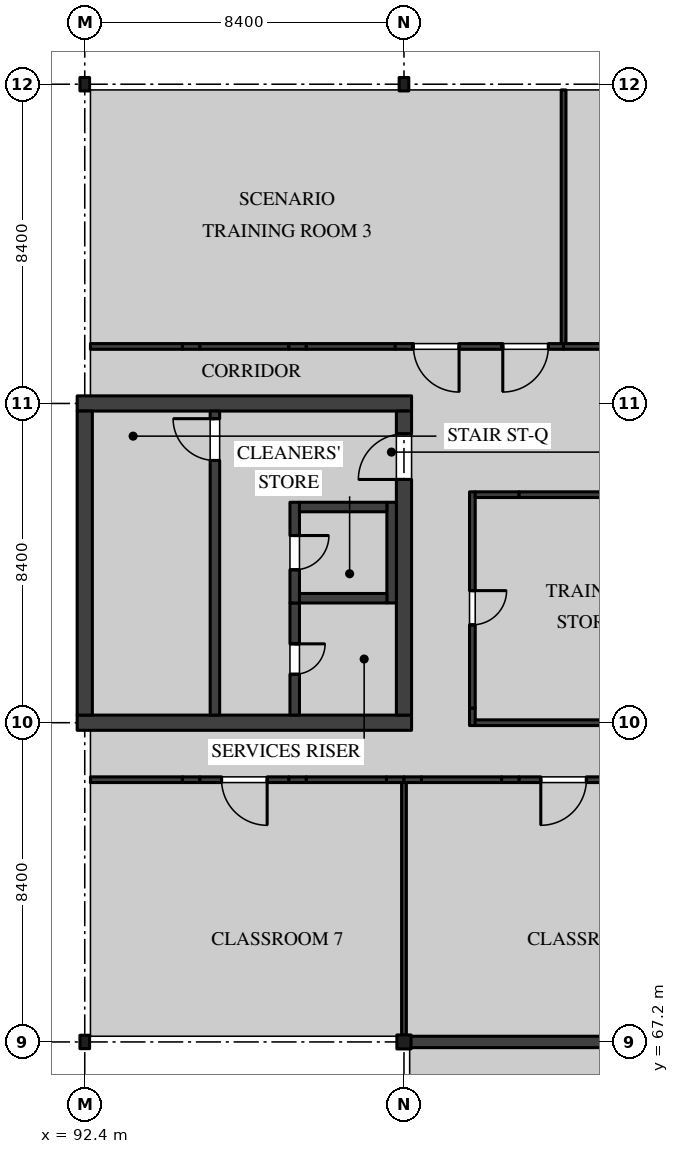
"""IFC4 building model, lengths in metres.
Left out: names, types, materials, properties, quantities, classifications, styles, units other than length and angle.
Written with IfcOpenShell. Run it as: python <this file> out.ifc"""

import sys

from ifc_helpers import new_model, si_unit, direction, frame, frame_2d, origin, origin_2d, place, context, subcontext, project, spatial, rectangle, i_section, extrude, element, fill, save


model = new_model("IFC4")
c1 = context("Model", 3, precision=1e-05, world=origin(), true_north=direction((0.0, 1.0)))
c2 = subcontext(c1, "Body", "Model", "MODEL_VIEW")
j1 = project(units=[si_unit("LENGTHUNIT", "METRE"), si_unit("PLANEANGLEUNIT", "RADIAN")], contexts=[c1])
p1 = place(None, origin())
s1 = spatial("IfcSite", under=j1, at=p1, CompositionType="ELEMENT")
p2 = place(p1, origin())
s2 = spatial("IfcBuilding", under=s1, at=p2, CompositionType="ELEMENT")
p3 = place(p2, frame((0.0, 0.0, 18.9)))
s3 = spatial("IfcBuildingStorey", under=s2, at=p3, CompositionType="ELEMENT", Elevation=18.9)
for number, where, z_axis, x_axis in (
    (1, (92.4, 67.2, 0.0), (0.0, 0.0, 1.0), (1.0, 0.0, 0.0)),
    (2, (92.4, 92.4, 0.0), (0.0, 0.0, 1.0), (1.0, 0.0, 0.0)),
):
    element("IfcColumn", number, at=place(p3, frame(where, z_axis=z_axis, x_axis=x_axis)), inside=s3, PredefinedType="COLUMN", context=c2, shape_type="SweptSolid", body=[
        extrude(i_section(OverallWidth=0.254, OverallDepth=0.353, WebThickness=0.01, FlangeThickness=0.016, FilletRadius=0.015, at=origin_2d()), origin(), (0.0, 0.0, 1.0), 4.37),
    ])
p4 = place(p3, frame((100.8, 67.2, 0.0), z_axis=(0.0, 0.0, 1.0), x_axis=(1.0, 0.0, 0.0)))
e3 = element("IfcColumn", 3, at=p4, inside=s3, PredefinedType="COLUMN", context=c2, shape_type="SweptSolid", body=[
    extrude(i_section(OverallWidth=0.373, OverallDepth=0.368, WebThickness=0.015, FlangeThickness=0.024, FilletRadius=0.015, at=origin_2d()), origin(), (0.0, 0.0, 1.0), 4.37),
])
p5 = place(p3, frame((100.8, 92.4, 0.0), z_axis=(0.0, 0.0, 1.0), x_axis=(1.0, 0.0, 0.0)))
e4 = element("IfcColumn", 4, at=p5, inside=s3, PredefinedType="COLUMN", context=c2, shape_type="SweptSolid", body=[
    extrude(i_section(OverallWidth=0.254, OverallDepth=0.353, WebThickness=0.01, FlangeThickness=0.016, FilletRadius=0.015, at=origin_2d()), origin(), (0.0, 0.0, 1.0), 4.37),
])
for number, where, z_axis, x_axis in (
    (5, (92.2, 75.6, 0.0), (0.0, 0.0, 1.0), (1.0, 0.0, 0.0)),
    (6, (92.2, 84.0, 0.0), (0.0, 0.0, 1.0), (1.0, 0.0, 0.0)),
):
    element("IfcWall", number, at=place(p3, frame(where, z_axis=z_axis, x_axis=x_axis)), inside=s3, PredefinedType="SHEAR", context=c2, shape_type="SweptSolid", body=[
        extrude(rectangle(XDim=8.8, YDim=0.4, at=frame_2d((4.4, 0.0))), origin(), (0.0, 0.0, 1.0), 4.37),
    ])
p6 = place(p3, frame((92.4, 75.8, 0.0), z_axis=(0.0, 0.0, 1.0), x_axis=(0.0, 1.0, 0.0)))
e7 = element("IfcWall", 7, at=p6, inside=s3, PredefinedType="SHEAR", context=c2, shape_type="SweptSolid", body=[
    extrude(rectangle(XDim=8.0, YDim=0.4, at=frame_2d((4.0, 0.0))), origin(), (0.0, 0.0, 1.0), 4.37),
])
p7 = place(p3, frame((100.8, 75.8, 0.0), z_axis=(0.0, 0.0, 1.0), x_axis=(0.0, 1.0, 0.0)))
e8 = element("IfcWall", 8, at=p7, inside=s3, PredefinedType="SHEAR", context=c2, shape_type="SweptSolid", body=[
    extrude(rectangle(XDim=8.0, YDim=0.4, at=frame_2d((4.0, 0.0))), origin(), (0.0, 0.0, 1.0), 4.37),
])
p8 = place(p7, frame((6.2, 0.0, 0.0)))
e9 = element("IfcOpeningElement", 9, at=p8, cuts=e8, PredefinedType="OPENING", context=c2, shape_type="SweptSolid", body=[
    extrude(rectangle(XDim=1.2, YDim=2.1, at=frame_2d((0.6, 1.05))), frame((0.0, 0.21, 0.0), z_axis=(0.0, -1.0, 0.0), x_axis=(1.0, 0.0, 0.0)), (0.0, 0.0, 1.0), 0.42),
])
p9 = place(p3, frame((95.825, 83.8, 0.0), z_axis=(0.0, 0.0, 1.0), x_axis=(0.0, -1.0, 0.0)))
e10 = element("IfcWall", 10, at=p9, inside=s3, PredefinedType="SOLIDWALL", context=c2, shape_type="SweptSolid", body=[
    extrude(rectangle(XDim=8.0, YDim=0.25, at=frame_2d((4.0, 0.0))), origin(), (0.0, 0.0, 1.0), 4.37),
])
p10 = place(p9, frame((0.2, 0.0, 0.0)))
e11 = element("IfcOpeningElement", 11, at=p10, cuts=e10, PredefinedType="OPENING", context=c2, shape_type="SweptSolid", body=[
    extrude(rectangle(XDim=1.1, YDim=2.1, at=frame_2d((0.55, 1.05))), frame((0.0, 0.135, 0.0), z_axis=(0.0, -1.0, 0.0), x_axis=(1.0, 0.0, 0.0)), (0.0, 0.0, 1.0), 0.27),
])
p11 = place(p3, frame((97.925, 78.75, 0.0), z_axis=(0.0, 0.0, 1.0), x_axis=(0.0, -1.0, 0.0)))
e12 = element("IfcWall", 12, at=p11, inside=s3, PredefinedType="SOLIDWALL", context=c2, shape_type="SweptSolid", body=[
    extrude(rectangle(XDim=2.95, YDim=0.25, at=frame_2d((1.475, 0.0))), origin(), (0.0, 0.0, 1.0), 4.37),
])
p12 = place(p11, frame((1.075, 0.0, 0.0)))
e13 = element("IfcOpeningElement", 13, at=p12, cuts=e12, PredefinedType="OPENING", context=c2, shape_type="SweptSolid", body=[
    extrude(rectangle(XDim=0.8, YDim=2.1, at=frame_2d((0.4, 1.05))), frame((0.0, 0.135, 0.0), z_axis=(0.0, -1.0, 0.0), x_axis=(1.0, 0.0, 0.0)), (0.0, 0.0, 1.0), 0.27),
])
p13 = place(p3, frame((97.925, 81.4, 0.0), z_axis=(0.0, 0.0, 1.0), x_axis=(0.0, -1.0, 0.0)))
e14 = element("IfcWall", 14, at=p13, inside=s3, PredefinedType="SOLIDWALL", context=c2, shape_type="SweptSolid", body=[
    extrude(rectangle(XDim=2.65, YDim=0.25, at=frame_2d((1.325, 0.0))), origin(), (0.0, 0.0, 1.0), 4.37),
])
p14 = place(p13, frame((0.875, 0.0, 0.0)))
e15 = element("IfcOpeningElement", 15, at=p14, cuts=e14, PredefinedType="OPENING", context=c2, shape_type="SweptSolid", body=[
    extrude(rectangle(XDim=0.9, YDim=2.1, at=frame_2d((0.45, 1.05))), frame((0.0, 0.135, 0.0), z_axis=(0.0, -1.0, 0.0), x_axis=(1.0, 0.0, 0.0)), (0.0, 0.0, 1.0), 0.27),
])
p15 = place(p3, frame((100.475, 81.4, 0.0), z_axis=(0.0, 0.0, 1.0), x_axis=(0.0, -1.0, 0.0)))
e16 = element("IfcWall", 16, at=p15, inside=s3, PredefinedType="SOLIDWALL", context=c2, shape_type="SweptSolid", body=[
    extrude(rectangle(XDim=2.65, YDim=0.25, at=frame_2d((1.325, 0.0))), origin(), (0.0, 0.0, 1.0), 4.37),
])
for number, where, z_axis, x_axis in (
    (17, (98.05, 81.275, 0.0), (0.0, 0.0, 1.0), (1.0, 0.0, 0.0)),
    (18, (98.05, 78.875, 0.0), (0.0, 0.0, 1.0), (1.0, 0.0, 0.0)),
):
    element("IfcWall", number, at=place(p3, frame(where, z_axis=z_axis, x_axis=x_axis)), inside=s3, PredefinedType="SOLIDWALL", context=c2, shape_type="SweptSolid", body=[
        extrude(rectangle(XDim=2.3, YDim=0.25, at=frame_2d((1.15, 0.0))), origin(), (0.0, 0.0, 1.0), 4.37),
    ])
p16 = place(p3, frame((102.6, 75.525, 0.0), z_axis=(0.0, 0.0, 1.0), x_axis=(0.0, 1.0, 0.0)))
e19 = element("IfcWall", 19, at=p16, inside=s3, PredefinedType="PARTITIONING", context=c2, shape_type="SweptSolid", body=[
    extrude(rectangle(XDim=0.46, YDim=0.15, at=frame_2d((0.23, 0.0))), origin(), (0.0, 0.0, 1.0), 3.819),
])
p17 = place(p3, frame((102.6, 75.985, 0.0), z_axis=(0.0, 0.0, 1.0), x_axis=(0.0, 1.0, 0.0)))
e20 = element("IfcWall", 20, at=p17, inside=s3, PredefinedType="PARTITIONING", context=c2, shape_type="SweptSolid", body=[
    extrude(rectangle(XDim=5.69, YDim=0.15, at=frame_2d((2.845, 0.0))), origin(), (0.0, 0.0, 1.0), 4.37),
])
p18 = place(p17, frame((2.19, 0.0, 0.0)))
e21 = element("IfcOpeningElement", 21, at=p18, cuts=e20, PredefinedType="OPENING", context=c2, shape_type="SweptSolid", body=[
    extrude(rectangle(XDim=0.9, YDim=2.1, at=frame_2d((0.45, 1.05))), frame((0.0, 0.085, 0.0), z_axis=(0.0, -1.0, 0.0), x_axis=(1.0, 0.0, 0.0)), (0.0, 0.0, 1.0), 0.17),
])
p19 = place(p3, frame((102.675, 75.6, 0.0), z_axis=(0.0, 0.0, 1.0), x_axis=(1.0, 0.0, 0.0)))
e22 = element("IfcWall", 22, at=p19, inside=s3, PredefinedType="PARTITIONING", context=c2, shape_type="SweptSolid", body=[
    extrude(rectangle(XDim=5.325, YDim=0.15, at=frame_2d((2.663, 0.0))), origin(), (0.0, 0.0, 1.0), 3.819),
])
p20 = place(p3, frame((102.675, 81.6, 0.0), z_axis=(0.0, 0.0, 1.0), x_axis=(1.0, 0.0, 0.0)))
e23 = element("IfcWall", 23, at=p20, inside=s3, PredefinedType="PARTITIONING", context=c2, shape_type="SweptSolid", body=[
    extrude(rectangle(XDim=1.155, YDim=0.15, at=frame_2d((0.578, 0.0))), origin(), (0.0, 0.0, 1.0), 3.946),
])
p21 = place(p3, frame((103.83, 81.6, 0.0), z_axis=(0.0, 0.0, 1.0), x_axis=(1.0, 0.0, 0.0)))
e24 = element("IfcWall", 24, at=p21, inside=s3, PredefinedType="PARTITIONING", context=c2, shape_type="SweptSolid", body=[
    extrude(rectangle(XDim=2.34, YDim=0.15, at=frame_2d((1.17, 0.0))), origin(), (0.0, 0.0, 1.0), 4.37),
])
p22 = place(p3, frame((105.0, 85.575, 0.0), z_axis=(0.0, 0.0, 1.0), x_axis=(0.0, 1.0, 0.0)))
e25 = element("IfcWall", 25, at=p22, inside=s3, PredefinedType="PARTITIONING", context=c2, shape_type="SweptSolid", body=[
    extrude(rectangle(XDim=6.675, YDim=0.125, at=frame_2d((3.337, 0.0))), origin(), (0.0, 0.0, 1.0), 4.37),
])
p23 = place(p3, frame((92.55, 85.5, 0.0), z_axis=(0.0, 0.0, 1.0), x_axis=(1.0, 0.0, 0.0)))
e26 = element("IfcWall", 26, at=p23, inside=s3, PredefinedType="PARTITIONING", context=c2, shape_type="SweptSolid", body=[
    extrude(rectangle(XDim=2.42, YDim=0.15, at=frame_2d((1.21, 0.0))), origin(), (0.0, 0.0, 1.0), 4.37),
])
p24 = place(p3, frame((94.97, 85.5, 0.0), z_axis=(0.0, 0.0, 1.0), x_axis=(1.0, 0.0, 0.0)))
e27 = element("IfcWall", 27, at=p24, inside=s3, PredefinedType="PARTITIONING", context=c2, shape_type="SweptSolid", body=[
    extrude(rectangle(XDim=0.46, YDim=0.15, at=frame_2d((0.23, 0.0))), origin(), (0.0, 0.0, 1.0), 3.946),
])
p25 = place(p3, frame((95.43, 85.5, 0.0), z_axis=(0.0, 0.0, 1.0), x_axis=(1.0, 0.0, 0.0)))
e28 = element("IfcWall", 28, at=p25, inside=s3, PredefinedType="PARTITIONING", context=c2, shape_type="SweptSolid", body=[
    extrude(rectangle(XDim=2.34, YDim=0.15, at=frame_2d((1.17, 0.0))), origin(), (0.0, 0.0, 1.0), 4.37),
])
p26 = place(p3, frame((97.77, 85.5, 0.0), z_axis=(0.0, 0.0, 1.0), x_axis=(1.0, 0.0, 0.0)))
e29 = element("IfcWall", 29, at=p26, inside=s3, PredefinedType="PARTITIONING", context=c2, shape_type="SweptSolid", body=[
    extrude(rectangle(XDim=0.46, YDim=0.15, at=frame_2d((0.23, 0.0))), origin(), (0.0, 0.0, 1.0), 3.946),
])
p27 = place(p3, frame((98.23, 85.5, 0.0), z_axis=(0.0, 0.0, 1.0), x_axis=(1.0, 0.0, 0.0)))
e30 = element("IfcWall", 30, at=p27, inside=s3, PredefinedType="PARTITIONING", context=c2, shape_type="SweptSolid", body=[
    extrude(rectangle(XDim=2.34, YDim=0.15, at=frame_2d((1.17, 0.0))), origin(), (0.0, 0.0, 1.0), 4.37),
])
p28 = place(p3, frame((100.57, 85.5, 0.0), z_axis=(0.0, 0.0, 1.0), x_axis=(1.0, 0.0, 0.0)))
e31 = element("IfcWall", 31, at=p28, inside=s3, PredefinedType="PARTITIONING", context=c2, shape_type="SweptSolid", body=[
    extrude(rectangle(XDim=0.46, YDim=0.15, at=frame_2d((0.23, 0.0))), origin(), (0.0, 0.0, 1.0), 3.819),
])
p29 = place(p3, frame((101.03, 85.5, 0.0), z_axis=(0.0, 0.0, 1.0), x_axis=(1.0, 0.0, 0.0)))
e32 = element("IfcWall", 32, at=p29, inside=s3, PredefinedType="PARTITIONING", context=c2, shape_type="SweptSolid", body=[
    extrude(rectangle(XDim=2.34, YDim=0.15, at=frame_2d((1.17, 0.0))), origin(), (0.0, 0.0, 1.0), 4.37),
])
p30 = place(p29, frame((0.02, 0.0, 0.0)))
e33 = element("IfcOpeningElement", 33, at=p30, cuts=e32, PredefinedType="OPENING", context=c2, shape_type="SweptSolid", body=[
    extrude(rectangle(XDim=1.2, YDim=2.4, at=frame_2d((0.6, 1.2))), frame((0.0, 0.085, 0.0), z_axis=(0.0, -1.0, 0.0), x_axis=(1.0, 0.0, 0.0)), (0.0, 0.0, 1.0), 0.17),
])
p31 = place(p3, frame((103.37, 85.5, 0.0), z_axis=(0.0, 0.0, 1.0), x_axis=(1.0, 0.0, 0.0)))
e34 = element("IfcWall", 34, at=p31, inside=s3, PredefinedType="PARTITIONING", context=c2, shape_type="SweptSolid", body=[
    extrude(rectangle(XDim=1.63, YDim=0.15, at=frame_2d((0.815, 0.0))), origin(), (0.0, 0.0, 1.0), 3.946),
])
p32 = place(p31, frame((0.03, 0.0, 0.0)))
e35 = element("IfcOpeningElement", 35, at=p32, cuts=e34, PredefinedType="OPENING", context=c2, shape_type="SweptSolid", body=[
    extrude(rectangle(XDim=1.2, YDim=2.4, at=frame_2d((0.6, 1.2))), frame((0.0, 0.085, 0.0), z_axis=(0.0, -1.0, 0.0), x_axis=(1.0, 0.0, 0.0)), (0.0, 0.0, 1.0), 0.17),
])
p33 = place(p3, frame((105.0, 85.5, 0.0), z_axis=(0.0, 0.0, 1.0), x_axis=(1.0, 0.0, 0.0)))
e36 = element("IfcWall", 36, at=p33, inside=s3, PredefinedType="PARTITIONING", context=c2, shape_type="SweptSolid", body=[
    extrude(rectangle(XDim=1.63, YDim=0.15, at=frame_2d((0.815, 0.0))), origin(), (0.0, 0.0, 1.0), 3.946),
])
p34 = place(p3, frame((92.55, 74.1, 0.0), z_axis=(0.0, 0.0, 1.0), x_axis=(1.0, 0.0, 0.0)))
e37 = element("IfcWall", 37, at=p34, inside=s3, PredefinedType="PARTITIONING", context=c2, shape_type="SweptSolid", body=[
    extrude(rectangle(XDim=2.42, YDim=0.15, at=frame_2d((1.21, 0.0))), origin(), (0.0, 0.0, 1.0), 4.37),
])
p35 = place(p3, frame((94.97, 74.1, 0.0), z_axis=(0.0, 0.0, 1.0), x_axis=(1.0, 0.0, 0.0)))
e38 = element("IfcWall", 38, at=p35, inside=s3, PredefinedType="PARTITIONING", context=c2, shape_type="SweptSolid", body=[
    extrude(rectangle(XDim=0.46, YDim=0.15, at=frame_2d((0.23, 0.0))), origin(), (0.0, 0.0, 1.0), 3.946),
])
p36 = place(p3, frame((95.43, 74.1, 0.0), z_axis=(0.0, 0.0, 1.0), x_axis=(1.0, 0.0, 0.0)))
e39 = element("IfcWall", 39, at=p36, inside=s3, PredefinedType="PARTITIONING", context=c2, shape_type="SweptSolid", body=[
    extrude(rectangle(XDim=2.34, YDim=0.15, at=frame_2d((1.17, 0.0))), origin(), (0.0, 0.0, 1.0), 4.37),
])
p37 = place(p36, frame((0.57, 0.0, 0.0)))
e40 = element("IfcOpeningElement", 40, at=p37, cuts=e39, PredefinedType="OPENING", context=c2, shape_type="SweptSolid", body=[
    extrude(rectangle(XDim=1.2, YDim=2.4, at=frame_2d((0.6, 1.2))), frame((0.0, 0.085, 0.0), z_axis=(0.0, -1.0, 0.0), x_axis=(1.0, 0.0, 0.0)), (0.0, 0.0, 1.0), 0.17),
])
p38 = place(p3, frame((97.77, 74.1, 0.0), z_axis=(0.0, 0.0, 1.0), x_axis=(1.0, 0.0, 0.0)))
e41 = element("IfcWall", 41, at=p38, inside=s3, PredefinedType="PARTITIONING", context=c2, shape_type="SweptSolid", body=[
    extrude(rectangle(XDim=0.46, YDim=0.15, at=frame_2d((0.23, 0.0))), origin(), (0.0, 0.0, 1.0), 3.946),
])
p39 = place(p3, frame((98.23, 74.1, 0.0), z_axis=(0.0, 0.0, 1.0), x_axis=(1.0, 0.0, 0.0)))
e42 = element("IfcWall", 42, at=p39, inside=s3, PredefinedType="PARTITIONING", context=c2, shape_type="SweptSolid", body=[
    extrude(rectangle(XDim=2.11, YDim=0.15, at=frame_2d((1.055, 0.0))), origin(), (0.0, 0.0, 1.0), 4.37),
])
for number, where, z_axis, x_axis in (
    (43, (100.34, 74.1, 0.0), (0.0, 0.0, 1.0), (1.0, 0.0, 0.0)),
    (44, (100.8, 74.1, 0.0), (0.0, 0.0, 1.0), (1.0, 0.0, 0.0)),
):
    element("IfcWall", number, at=place(p3, frame(where, z_axis=z_axis, x_axis=x_axis)), inside=s3, PredefinedType="PARTITIONING", context=c2, shape_type="SweptSolid", body=[
        extrude(rectangle(XDim=0.46, YDim=0.15, at=frame_2d((0.23, 0.0))), origin(), (0.0, 0.0, 1.0), 3.819),
    ])
p40 = place(p3, frame((101.26, 74.1, 0.0), z_axis=(0.0, 0.0, 1.0), x_axis=(1.0, 0.0, 0.0)))
e45 = element("IfcWall", 45, at=p40, inside=s3, PredefinedType="PARTITIONING", context=c2, shape_type="SweptSolid", body=[
    extrude(rectangle(XDim=2.11, YDim=0.15, at=frame_2d((1.055, 0.0))), origin(), (0.0, 0.0, 1.0), 4.37),
])
p41 = place(p3, frame((103.37, 74.1, 0.0), z_axis=(0.0, 0.0, 1.0), x_axis=(1.0, 0.0, 0.0)))
e46 = element("IfcWall", 46, at=p41, inside=s3, PredefinedType="PARTITIONING", context=c2, shape_type="SweptSolid", body=[
    extrude(rectangle(XDim=0.46, YDim=0.15, at=frame_2d((0.23, 0.0))), origin(), (0.0, 0.0, 1.0), 3.946),
])
p42 = place(p3, frame((103.83, 74.1, 0.0), z_axis=(0.0, 0.0, 1.0), x_axis=(1.0, 0.0, 0.0)))
e47 = element("IfcWall", 47, at=p42, inside=s3, PredefinedType="PARTITIONING", context=c2, shape_type="SweptSolid", body=[
    extrude(rectangle(XDim=2.34, YDim=0.15, at=frame_2d((1.17, 0.0))), origin(), (0.0, 0.0, 1.0), 4.37),
])
p43 = place(p42, frame((0.57, 0.0, 0.0)))
e48 = element("IfcOpeningElement", 48, at=p43, cuts=e47, PredefinedType="OPENING", context=c2, shape_type="SweptSolid", body=[
    extrude(rectangle(XDim=1.2, YDim=2.4, at=frame_2d((0.6, 1.2))), frame((0.0, 0.085, 0.0), z_axis=(0.0, -1.0, 0.0), x_axis=(1.0, 0.0, 0.0)), (0.0, 0.0, 1.0), 0.17),
])
p44 = place(p3, frame((100.8, 67.384, 0.0), z_axis=(0.0, 0.0, 1.0), x_axis=(0.0, 1.0, 0.0)))
e49 = element("IfcWall", 49, at=p44, inside=s3, PredefinedType="PARTITIONING", context=c2, shape_type="SweptSolid", body=[
    extrude(rectangle(XDim=6.641, YDim=0.125, at=frame_2d((3.32, 0.0))), origin(), (0.0, 0.0, 1.0), 3.819),
])
p45 = place(p3, frame((109.0, 67.2, 0.0), z_axis=(0.0, 0.0, 1.0), x_axis=(-1.0, 0.0, 0.0)))
e50 = element("IfcWall", 50, at=p45, inside=s3, PredefinedType="SOLIDWALL", context=c2, shape_type="SweptSolid", body=[
    extrude(rectangle(XDim=8.197, YDim=0.3, at=frame_2d((4.099, 0.0))), origin(), (0.0, 0.0, 1.0), 3.746),
])
p46 = place(p8, origin())
e51 = element("IfcDoor", 51, at=p46, inside=s3, OperationType="SINGLE_SWING_RIGHT", PredefinedType="DOOR", context=c2, shape_type="SweptSolid", body=[
    extrude(rectangle(XDim=1.2, YDim=2.1, at=frame_2d((0.6, 1.05))), frame((0.0, 0.035, 0.0), z_axis=(0.0, -1.0, 0.0), x_axis=(1.0, 0.0, 0.0)), (0.0, 0.0, 1.0), 0.07),
])
fill(e9, e51)
p47 = place(p14, origin())
e52 = element("IfcDoor", 52, at=p47, inside=s3, OperationType="SINGLE_SWING_RIGHT", PredefinedType="DOOR", context=c2, shape_type="SweptSolid", body=[
    extrude(rectangle(XDim=0.9, YDim=2.1, at=frame_2d((0.45, 1.05))), frame((0.0, 0.035, 0.0), z_axis=(0.0, -1.0, 0.0), x_axis=(1.0, 0.0, 0.0)), (0.0, 0.0, 1.0), 0.07),
])
fill(e15, e52)
p48 = place(p12, origin())
e53 = element("IfcDoor", 53, at=p48, inside=s3, OperationType="SINGLE_SWING_RIGHT", PredefinedType="DOOR", context=c2, shape_type="SweptSolid", body=[
    extrude(rectangle(XDim=0.8, YDim=2.1, at=frame_2d((0.4, 1.05))), frame((0.0, 0.035, 0.0), z_axis=(0.0, -1.0, 0.0), x_axis=(1.0, 0.0, 0.0)), (0.0, 0.0, 1.0), 0.07),
])
fill(e13, e53)
p49 = place(p10, frame((1.1, 0.0, 0.0), z_axis=(0.0, 0.0, 1.0), x_axis=(-1.0, 0.0, 0.0)))
e54 = element("IfcDoor", 54, at=p49, inside=s3, OperationType="SINGLE_SWING_LEFT", PredefinedType="DOOR", context=c2, shape_type="SweptSolid", body=[
    extrude(rectangle(XDim=1.1, YDim=2.1, at=frame_2d((0.55, 1.05))), frame((0.0, 0.035, 0.0), z_axis=(0.0, -1.0, 0.0), x_axis=(1.0, 0.0, 0.0)), (0.0, 0.0, 1.0), 0.07),
])
fill(e11, e54)
p50 = place(p18, frame((0.9, 0.0, 0.0), z_axis=(0.0, 0.0, 1.0), x_axis=(-1.0, 0.0, 0.0)))
e55 = element("IfcDoor", 55, at=p50, inside=s3, OperationType="SINGLE_SWING_RIGHT", PredefinedType="DOOR", context=c2, shape_type="SweptSolid", body=[
    extrude(rectangle(XDim=0.9, YDim=2.1, at=frame_2d((0.45, 1.05))), frame((0.0, 0.025, 0.0), z_axis=(0.0, -1.0, 0.0), x_axis=(1.0, 0.0, 0.0)), (0.0, 0.0, 1.0), 0.05),
])
fill(e21, e55)
p51 = place(p30, frame((1.2, 0.0, 0.0), z_axis=(0.0, 0.0, 1.0), x_axis=(-1.0, 0.0, 0.0)))
e56 = element("IfcDoor", 56, at=p51, inside=s3, OperationType="SINGLE_SWING_RIGHT", PredefinedType="DOOR", context=c2, shape_type="SweptSolid", body=[
    extrude(rectangle(XDim=1.2, YDim=2.4, at=frame_2d((0.6, 1.2))), frame((0.0, 0.025, 0.0), z_axis=(0.0, -1.0, 0.0), x_axis=(1.0, 0.0, 0.0)), (0.0, 0.0, 1.0), 0.05),
])
fill(e33, e56)
p52 = place(p32, frame((1.2, 0.0, 0.0), z_axis=(0.0, 0.0, 1.0), x_axis=(-1.0, 0.0, 0.0)))
e57 = element("IfcDoor", 57, at=p52, inside=s3, OperationType="SINGLE_SWING_LEFT", PredefinedType="DOOR", context=c2, shape_type="SweptSolid", body=[
    extrude(rectangle(XDim=1.2, YDim=2.4, at=frame_2d((0.6, 1.2))), frame((0.0, 0.025, 0.0), z_axis=(0.0, -1.0, 0.0), x_axis=(1.0, 0.0, 0.0)), (0.0, 0.0, 1.0), 0.05),
])
fill(e35, e57)
p53 = place(p37, frame((1.2, 0.0, 0.0), z_axis=(0.0, 0.0, 1.0), x_axis=(-1.0, 0.0, 0.0)))
e58 = element("IfcDoor", 58, at=p53, inside=s3, OperationType="SINGLE_SWING_RIGHT", PredefinedType="DOOR", context=c2, shape_type="SweptSolid", body=[
    extrude(rectangle(XDim=1.2, YDim=2.4, at=frame_2d((0.6, 1.2))), frame((0.0, 0.025, 0.0), z_axis=(0.0, -1.0, 0.0), x_axis=(1.0, 0.0, 0.0)), (0.0, 0.0, 1.0), 0.05),
])
fill(e40, e58)
p54 = place(p43, frame((1.2, 0.0, 0.0), z_axis=(0.0, 0.0, 1.0), x_axis=(-1.0, 0.0, 0.0)))
e59 = element("IfcDoor", 59, at=p54, inside=s3, OperationType="SINGLE_SWING_LEFT", PredefinedType="DOOR", context=c2, shape_type="SweptSolid", body=[
    extrude(rectangle(XDim=1.2, YDim=2.4, at=frame_2d((0.6, 1.2))), frame((0.0, 0.025, 0.0), z_axis=(0.0, -1.0, 0.0), x_axis=(1.0, 0.0, 0.0)), (0.0, 0.0, 1.0), 0.05),
])
fill(e48, e59)
save(model, sys.argv[1])
